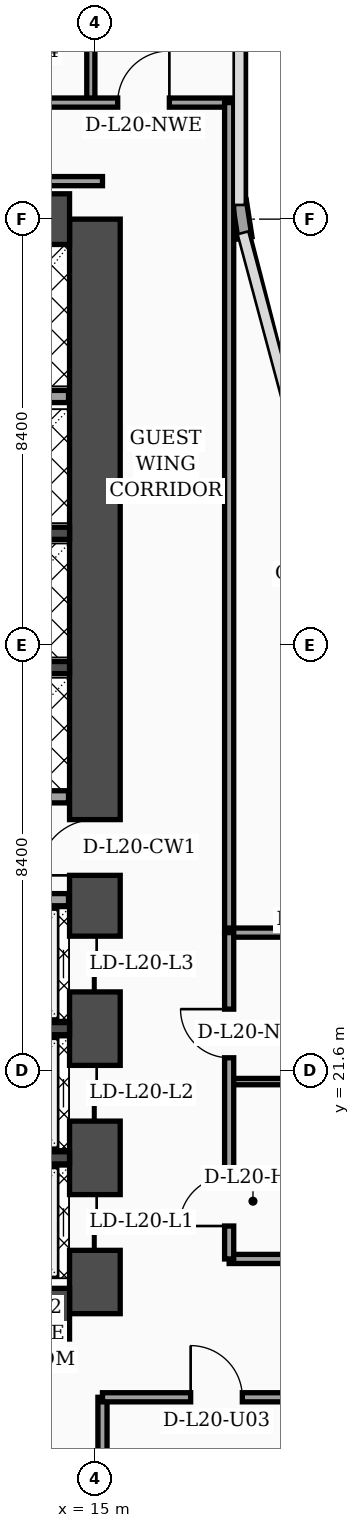
"""IFC4 building model, lengths in metres.
Left out: names, types, materials, properties, quantities, classifications, styles, units other than length and angle.
Written with IfcOpenShell. Run it as: python <this file> out.ifc"""

import sys

from ifc_helpers import new_model, si_unit, direction, frame, frame_2d, origin, place, context, subcontext, project, spatial, rectangle, extrude, element, fill, save


model = new_model("IFC4")
c1 = context("Model", 3, precision=1e-05, world=origin(), true_north=direction((0.0, 1.0)))
c2 = subcontext(c1, "Body", "Model", "MODEL_VIEW")
j1 = project(units=[si_unit("LENGTHUNIT", "METRE"), si_unit("PLANEANGLEUNIT", "RADIAN")], contexts=[c1])
p1 = place(None, origin())
s1 = spatial("IfcSite", under=j1, at=p1, CompositionType="ELEMENT")
p2 = place(p1, origin())
s2 = spatial("IfcBuilding", under=s1, at=p2, CompositionType="ELEMENT")
p3 = place(p2, frame((0.0, 0.0, 85.0)))
s3 = spatial("IfcBuildingStorey", under=s2, at=p3, CompositionType="ELEMENT", Elevation=85.0)
p4 = place(p3, frame((15.0, 16.8, 0.0), z_axis=(0.0, 0.0, 1.0), x_axis=(0.0, 1.0, 0.0)))
e1 = element("IfcWall", 1, at=p4, inside=s3, PredefinedType="SHEAR", context=c2, shape_type="SweptSolid", body=[
    extrude(rectangle(XDim=21.6, YDim=1.0, at=frame_2d((10.8, 0.0))), origin(), (0.0, 0.0, 1.0), 3.56),
])
p5 = place(p4, frame((8.65, 0.0, 0.0)))
e2 = element("IfcOpeningElement", 2, at=p5, cuts=e1, PredefinedType="OPENING", context=c2, shape_type="SweptSolid", body=[
    extrude(rectangle(XDim=1.1, YDim=2.2, at=frame_2d((0.55, 1.1))), frame((0.0, 0.51, 0.0), z_axis=(0.0, -1.0, 0.0), x_axis=(1.0, 0.0, 0.0)), (0.0, 0.0, 1.0), 1.02),
])
p6 = place(p4, frame((1.25, 0.0, 0.0)))
e3 = element("IfcOpeningElement", 3, at=p6, cuts=e1, PredefinedType="OPENING", context=c2, shape_type="SweptSolid", body=[
    extrude(rectangle(XDim=1.1, YDim=2.2, at=frame_2d((0.55, 1.1))), frame((0.0, 0.51, 0.0), z_axis=(0.0, -1.0, 0.0), x_axis=(1.0, 0.0, 0.0)), (0.0, 0.0, 1.0), 1.02),
])
p7 = place(p4, frame((3.8, 0.0, 0.0)))
e4 = element("IfcOpeningElement", 4, at=p7, cuts=e1, PredefinedType="OPENING", context=c2, shape_type="SweptSolid", body=[
    extrude(rectangle(XDim=1.1, YDim=2.2, at=frame_2d((0.55, 1.1))), frame((0.0, 0.51, 0.0), z_axis=(0.0, -1.0, 0.0), x_axis=(1.0, 0.0, 0.0)), (0.0, 0.0, 1.0), 1.02),
])
p8 = place(p4, frame((6.35, 0.0, 0.0)))
e5 = element("IfcOpeningElement", 5, at=p8, cuts=e1, PredefinedType="OPENING", context=c2, shape_type="SweptSolid", body=[
    extrude(rectangle(XDim=1.1, YDim=2.2, at=frame_2d((0.55, 1.1))), frame((0.0, 0.51, 0.0), z_axis=(0.0, -1.0, 0.0), x_axis=(1.0, 0.0, 0.0)), (0.0, 0.0, 1.0), 1.02),
])
for number, where, z_axis, x_axis in (
    (6, (4.7, 38.4, 0.0), (0.0, 0.0, 1.0), (1.0, 0.0, 0.0)),
    (7, (4.7, 16.8, 0.0), (0.0, 0.0, 1.0), (1.0, 0.0, 0.0)),
):
    element("IfcWall", number, at=place(p3, frame(where, z_axis=z_axis, x_axis=x_axis)), inside=s3, PredefinedType="SHEAR", context=c2, shape_type="SweptSolid", body=[
        extrude(rectangle(XDim=9.8, YDim=1.0, at=frame_2d((4.9, 0.0))), origin(), (0.0, 0.0, 1.0), 3.56),
    ])
for number, where, z_axis, x_axis in (
    (8, (12.18, 19.875, 0.0), (0.0, 0.0, 1.0), (1.0, 0.0, 0.0)),
    (9, (12.18, 22.425, 0.0), (0.0, 0.0, 1.0), (1.0, 0.0, 0.0)),
    (10, (12.18, 29.55, 0.0), (0.0, 0.0, 1.0), (1.0, 0.0, 0.0)),
    (11, (12.18, 32.2, 0.0), (0.0, 0.0, 1.0), (1.0, 0.0, 0.0)),
):
    element("IfcWall", number, at=place(p3, frame(where, z_axis=z_axis, x_axis=x_axis)), inside=s3, PredefinedType="SOLIDWALL", context=c2, shape_type="SweptSolid", body=[
        extrude(rectangle(XDim=2.32, YDim=0.24, at=frame_2d((1.16, 0.0))), origin(), (0.0, 0.0, 1.0), 3.56),
    ])
p9 = place(p3, frame((17.962, 38.03, 0.0), z_axis=(0.0, 0.0, 1.0), x_axis=(-0.15141125477, 0.988470855377, 0.0)))
e12 = element("IfcWall", 12, at=p9, inside=s3, PredefinedType="SOLIDWALL", context=c2, shape_type="SweptSolid", body=[
    extrude(rectangle(XDim=0.739, YDim=0.28, at=frame_2d((0.369, 0.0))), origin(), (0.0, 0.0, 1.0), 3.56),
])
p10 = place(p3, frame((12.15, 24.97, 0.0), z_axis=(0.0, 0.0, 1.0), x_axis=(1.0, 0.0, 0.0)))
e13 = element("IfcWall", 13, at=p10, inside=s3, PredefinedType="SOLIDWALL", context=c2, shape_type="SweptSolid", body=[
    extrude(rectangle(XDim=2.33, YDim=0.24, at=frame_2d((1.165, 0.0))), origin(), (0.0, 0.0, 1.0), 2.84),
])
p11 = place(p3, frame((12.25, 27.0, 0.0), z_axis=(0.0, 0.0, 1.0), x_axis=(1.0, 0.0, 0.0)))
e14 = element("IfcWall", 14, at=p11, inside=s3, PredefinedType="SOLIDWALL", context=c2, shape_type="SweptSolid", body=[
    extrude(rectangle(XDim=2.23, YDim=0.24, at=frame_2d((1.115, 0.0))), origin(), (0.0, 0.0, 1.0), 3.56),
])
p12 = place(p3, frame((9.66, 34.9, 0.0), z_axis=(0.0, 0.0, 1.0), x_axis=(1.0, 0.0, 0.0)))
e15 = element("IfcWall", 15, at=p12, inside=s3, PredefinedType="SOLIDWALL", context=c2, shape_type="SweptSolid", body=[
    extrude(rectangle(XDim=4.82, YDim=0.24, at=frame_2d((2.41, 0.0))), origin(), (0.0, 0.0, 1.0), 3.56),
])
p13 = place(p3, frame((15.15, 2.44, 0.0), z_axis=(0.0, 0.0, 1.0), x_axis=(0.0, 1.0, 0.0)))
e16 = element("IfcWall", 16, at=p13, inside=s3, PredefinedType="PARTITIONING", context=c2, shape_type="SweptSolid", body=[
    extrude(rectangle(XDim=12.71, YDim=0.18, at=frame_2d((6.355, 0.0))), origin(), (0.0, 0.0, 1.0), 3.04),
])
p14 = place(p3, frame((15.15, 15.15, 0.0), z_axis=(0.0, 0.0, 1.0), x_axis=(1.0, 0.0, 0.0)))
e17 = element("IfcWall", 17, at=p14, inside=s3, PredefinedType="PARTITIONING", context=c2, shape_type="SweptSolid", body=[
    extrude(rectangle(XDim=6.45, YDim=0.18, at=frame_2d((3.225, 0.0))), origin(), (0.0, 0.0, 1.0), 2.34),
])
p15 = place(p14, frame((1.74, 0.0, 0.0)))
e18 = element("IfcOpeningElement", 18, at=p15, cuts=e17, PredefinedType="OPENING", context=c2, shape_type="SweptSolid", body=[
    extrude(rectangle(XDim=1.02, YDim=2.2, at=frame_2d((0.51, 1.1))), frame((0.0, 0.1, 0.0), z_axis=(0.0, -1.0, 0.0), x_axis=(1.0, 0.0, 0.0)), (0.0, 0.0, 1.0), 0.2),
])
p16 = place(p3, frame((14.92, 40.7, 0.0), z_axis=(0.0, 0.0, 1.0), x_axis=(0.0, 1.0, 0.0)))
e19 = element("IfcWall", 19, at=p16, inside=s3, PredefinedType="PARTITIONING", context=c2, shape_type="SweptSolid", body=[
    extrude(rectangle(XDim=7.1, YDim=0.16, at=frame_2d((3.55, 0.0))), origin(), (0.0, 0.0, 1.0), 3.04),
])
p17 = place(p3, frame((0.08, 40.7, 0.0), z_axis=(0.0, 0.0, 1.0), x_axis=(1.0, 0.0, 0.0)))
e20 = element("IfcWall", 20, at=p17, inside=s3, PredefinedType="PARTITIONING", context=c2, shape_type="SweptSolid", body=[
    extrude(rectangle(XDim=17.77, YDim=0.18, at=frame_2d((8.885, 0.0))), origin(), (0.0, 0.0, 1.0), 2.84),
])
p18 = place(p17, frame((0.9, 0.0, 0.0)))
e21 = element("IfcOpeningElement", 21, at=p18, cuts=e20, PredefinedType="OPENING", context=c2, shape_type="SweptSolid", body=[
    extrude(rectangle(XDim=1.02, YDim=2.2, at=frame_2d((0.51, 1.1))), frame((0.0, 0.1, 0.0), z_axis=(0.0, -1.0, 0.0), x_axis=(1.0, 0.0, 0.0)), (0.0, 0.0, 1.0), 0.2),
])
p19 = place(p17, frame((7.38, 0.0, 0.0)))
e22 = element("IfcOpeningElement", 22, at=p19, cuts=e20, PredefinedType="OPENING", context=c2, shape_type="SweptSolid", body=[
    extrude(rectangle(XDim=1.02, YDim=2.2, at=frame_2d((0.51, 1.1))), frame((0.0, 0.1, 0.0), z_axis=(0.0, -1.0, 0.0), x_axis=(1.0, 0.0, 0.0)), (0.0, 0.0, 1.0), 0.2),
])
p20 = place(p17, frame((15.37, 0.0, 0.0)))
e23 = element("IfcOpeningElement", 23, at=p20, cuts=e20, PredefinedType="OPENING", context=c2, shape_type="SweptSolid", body=[
    extrude(rectangle(XDim=1.02, YDim=2.2, at=frame_2d((0.51, 1.1))), frame((0.0, 0.1, 0.0), z_axis=(0.0, -1.0, 0.0), x_axis=(1.0, 0.0, 0.0)), (0.0, 0.0, 1.0), 0.2),
])
p21 = place(p3, frame((17.65, 24.3, 0.0), z_axis=(0.0, 0.0, 1.0), x_axis=(0.0, 1.0, 0.0)))
e24 = element("IfcWall", 24, at=p21, inside=s3, PredefinedType="PARTITIONING", context=c2, shape_type="SweptSolid", body=[
    extrude(rectangle(XDim=16.4, YDim=0.18, at=frame_2d((8.2, 0.0))), origin(), (0.0, 0.0, 1.0), 2.84),
])
p22 = place(p3, frame((3.68, 39.15, 0.0), z_axis=(0.0, 0.0, 1.0), x_axis=(1.0, 0.0, 0.0)))
e25 = element("IfcWall", 25, at=p22, inside=s3, PredefinedType="PARTITIONING", context=c2, shape_type="SweptSolid", body=[
    extrude(rectangle(XDim=11.47, YDim=0.18, at=frame_2d((5.735, 0.0))), origin(), (0.0, 0.0, 1.0), 2.84),
])
p23 = place(p3, frame((17.65, 17.88, 0.0), z_axis=(0.0, 0.0, 1.0), x_axis=(1.0, 0.0, 0.0)))
e26 = element("IfcWall", 26, at=p23, inside=s3, PredefinedType="PARTITIONING", context=c2, shape_type="SweptSolid", body=[
    extrude(rectangle(XDim=3.9, YDim=0.18, at=frame_2d((1.95, 0.0))), origin(), (0.0, 0.0, 1.0), 3.56),
])
p24 = place(p3, frame((17.65, 21.38, 0.0), z_axis=(0.0, 0.0, 1.0), x_axis=(1.0, 0.0, 0.0)))
e27 = element("IfcWall", 27, at=p24, inside=s3, PredefinedType="PARTITIONING", context=c2, shape_type="SweptSolid", body=[
    extrude(rectangle(XDim=3.9, YDim=0.125, at=frame_2d((1.95, 0.0))), origin(), (0.0, 0.0, 1.0), 3.09),
])
p25 = place(p3, frame((17.65, 24.32, 0.0), z_axis=(0.0, 0.0, 1.0), x_axis=(1.0, 0.0, 0.0)))
e28 = element("IfcWall", 28, at=p25, inside=s3, PredefinedType="PARTITIONING", context=c2, shape_type="SweptSolid", body=[
    extrude(rectangle(XDim=3.95, YDim=0.18, at=frame_2d((1.975, 0.0))), origin(), (0.0, 0.0, 1.0), 3.56),
])
p26 = place(p3, frame((17.65, 17.88, 0.0), z_axis=(0.0, 0.0, 1.0), x_axis=(0.0, 1.0, 0.0)))
e29 = element("IfcWall", 29, at=p26, inside=s3, PredefinedType="PARTITIONING", context=c2, shape_type="SweptSolid", body=[
    extrude(rectangle(XDim=6.44, YDim=0.18, at=frame_2d((3.22, 0.0))), origin(), (0.0, 0.0, 1.0), 3.09),
])
p27 = place(p26, frame((0.65, 0.0, 0.0)))
e30 = element("IfcOpeningElement", 30, at=p27, cuts=e29, PredefinedType="OPENING", context=c2, shape_type="SweptSolid", body=[
    extrude(rectangle(XDim=0.98, YDim=2.15, at=frame_2d((0.49, 1.075))), frame((0.0, 0.1, 0.0), z_axis=(0.0, -1.0, 0.0), x_axis=(1.0, 0.0, 0.0)), (0.0, 0.0, 1.0), 0.2),
])
p28 = place(p26, frame((3.97, 0.0, 0.0)))
e31 = element("IfcOpeningElement", 31, at=p28, cuts=e29, PredefinedType="OPENING", context=c2, shape_type="SweptSolid", body=[
    extrude(rectangle(XDim=0.96, YDim=2.2, at=frame_2d((0.48, 1.1))), frame((0.0, 0.1, 0.0), z_axis=(0.0, -1.0, 0.0), x_axis=(1.0, 0.0, 0.0)), (0.0, 0.0, 1.0), 0.2),
])
p29 = place(p15, origin())
e32 = element("IfcDoor", 32, at=p29, inside=s3, OperationType="SINGLE_SWING_LEFT", PredefinedType="DOOR", context=c2, shape_type="SweptSolid", body=[
    extrude(rectangle(XDim=1.02, YDim=2.2, at=frame_2d((0.51, 1.1))), frame((0.0, 0.025, 0.0), z_axis=(0.0, -1.0, 0.0), x_axis=(1.0, 0.0, 0.0)), (0.0, 0.0, 1.0), 0.05),
])
fill(e18, e32)
p30 = place(p20, origin())
e33 = element("IfcDoor", 33, at=p30, inside=s3, OperationType="SINGLE_SWING_RIGHT", PredefinedType="DOOR", context=c2, shape_type="SweptSolid", body=[
    extrude(rectangle(XDim=1.02, YDim=2.2, at=frame_2d((0.51, 1.1))), frame((0.0, 0.025, 0.0), z_axis=(0.0, -1.0, 0.0), x_axis=(1.0, 0.0, 0.0)), (0.0, 0.0, 1.0), 0.05),
])
fill(e23, e33)
p31 = place(p27, origin())
e34 = element("IfcDoor", 34, at=p31, inside=s3, OperationType="SINGLE_SWING_LEFT", PredefinedType="DOOR", context=c2, shape_type="SweptSolid", body=[
    extrude(rectangle(XDim=0.98, YDim=2.15, at=frame_2d((0.49, 1.075))), frame((0.0, 0.025, 0.0), z_axis=(0.0, -1.0, 0.0), x_axis=(1.0, 0.0, 0.0)), (0.0, 0.0, 1.0), 0.05),
])
fill(e30, e34)
p32 = place(p28, origin())
e35 = element("IfcDoor", 35, at=p32, inside=s3, OperationType="SINGLE_SWING_RIGHT", PredefinedType="DOOR", context=c2, shape_type="SweptSolid", body=[
    extrude(rectangle(XDim=0.96, YDim=2.2, at=frame_2d((0.48, 1.1))), frame((0.0, 0.025, 0.0), z_axis=(0.0, -1.0, 0.0), x_axis=(1.0, 0.0, 0.0)), (0.0, 0.0, 1.0), 0.05),
])
fill(e31, e35)
p33 = place(p5, origin())
e36 = element("IfcDoor", 36, at=p33, inside=s3, OperationType="SINGLE_SWING_LEFT", PredefinedType="DOOR", context=c2, shape_type="SweptSolid", body=[
    extrude(rectangle(XDim=1.1, YDim=2.2, at=frame_2d((0.55, 1.1))), frame((0.0, 0.025, 0.0), z_axis=(0.0, -1.0, 0.0), x_axis=(1.0, 0.0, 0.0)), (0.0, 0.0, 1.0), 0.05),
])
fill(e2, e36)
p34 = place(p6, origin())
e37 = element("IfcDoor", 37, at=p34, inside=s3, OperationType="DOUBLE_DOOR_SLIDING", PredefinedType="DOOR", context=c2, shape_type="SweptSolid", body=[
    extrude(rectangle(XDim=1.1, YDim=2.2, at=frame_2d((0.55, 1.1))), frame((0.0, 0.025, 0.0), z_axis=(0.0, -1.0, 0.0), x_axis=(1.0, 0.0, 0.0)), (0.0, 0.0, 1.0), 0.05),
])
fill(e3, e37)
p35 = place(p7, origin())
e38 = element("IfcDoor", 38, at=p35, inside=s3, OperationType="DOUBLE_DOOR_SLIDING", PredefinedType="DOOR", context=c2, shape_type="SweptSolid", body=[
    extrude(rectangle(XDim=1.1, YDim=2.2, at=frame_2d((0.55, 1.1))), frame((0.0, 0.025, 0.0), z_axis=(0.0, -1.0, 0.0), x_axis=(1.0, 0.0, 0.0)), (0.0, 0.0, 1.0), 0.05),
])
fill(e4, e38)
p36 = place(p8, origin())
e39 = element("IfcDoor", 39, at=p36, inside=s3, OperationType="DOUBLE_DOOR_SLIDING", PredefinedType="DOOR", context=c2, shape_type="SweptSolid", body=[
    extrude(rectangle(XDim=1.1, YDim=2.2, at=frame_2d((0.55, 1.1))), frame((0.0, 0.025, 0.0), z_axis=(0.0, -1.0, 0.0), x_axis=(1.0, 0.0, 0.0)), (0.0, 0.0, 1.0), 0.05),
])
fill(e5, e39)
save(model, sys.argv[1])
